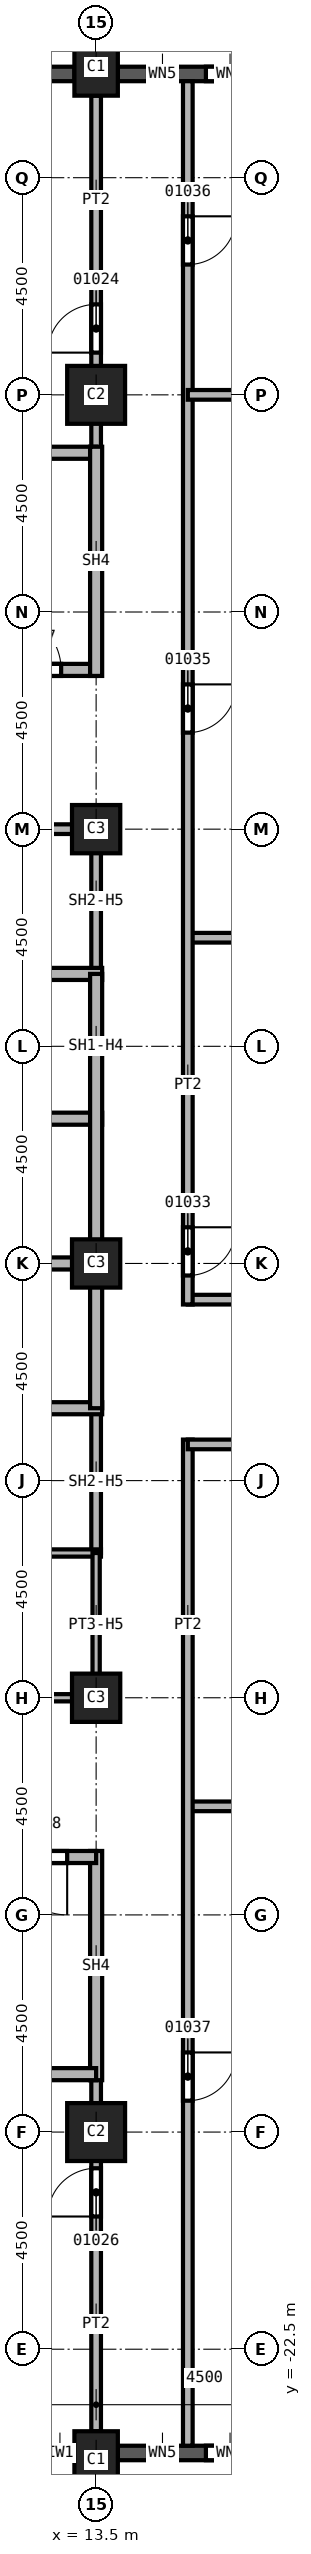
"""IFC4 building model, lengths in metres.
Left out: names, types, materials, properties, quantities, classifications, styles, units other than length and angle.
Written with IfcOpenShell. Run it as: python <this file> out.ifc"""

import sys

from ifc_helpers import new_model, si_unit, direction, frame, frame_2d, origin, origin_2d, place, context, subcontext, project, spatial, rectangle, extrude, element, fill, save


model = new_model("IFC4")
c1 = context("Model", 3, precision=1e-05, world=origin(), true_north=direction((0.0, 1.0)))
c2 = subcontext(c1, "Body", "Model", "MODEL_VIEW")
j1 = project(units=[si_unit("LENGTHUNIT", "METRE"), si_unit("PLANEANGLEUNIT", "RADIAN")], contexts=[c1])
p1 = place(None, origin())
s1 = spatial("IfcSite", under=j1, at=p1, CompositionType="ELEMENT")
p2 = place(p1, origin())
s2 = spatial("IfcBuilding", under=s1, at=p2, CompositionType="ELEMENT")
p3 = place(p2, frame((0.0, 0.0, 68.0)))
s3 = spatial("IfcBuildingStorey", under=s2, at=p3, CompositionType="ELEMENT", Elevation=68.0)
for number, where, z_axis, x_axis in (
    (1, (13.5, 18.0, 0.0), (0.0, 0.0, 1.0), (1.0, 0.0, 0.0)),
    (2, (13.5, -18.0, 0.0), (0.0, 0.0, 1.0), (1.0, 0.0, 0.0)),
):
    element("IfcColumn", number, at=place(p3, frame(where, z_axis=z_axis, x_axis=x_axis)), inside=s3, PredefinedType="COLUMN", context=c2, shape_type="SweptSolid", body=[
        extrude(rectangle(XDim=1.2, YDim=1.2, at=origin_2d()), origin(), (0.0, 0.0, 1.0), 3.7),
    ])
for number, where, z_axis, x_axis in (
    (3, (13.5, 0.0, 0.0), (0.0, 0.0, 1.0), (1.0, 0.0, 0.0)),
    (4, (13.5, 9.0, 0.0), (0.0, 0.0, 1.0), (1.0, 0.0, 0.0)),
    (5, (13.5, -9.0, 0.0), (0.0, 0.0, 1.0), (1.0, 0.0, 0.0)),
):
    element("IfcColumn", number, at=place(p3, frame(where, z_axis=z_axis, x_axis=x_axis)), inside=s3, PredefinedType="COLUMN", context=c2, shape_type="SweptSolid", body=[
        extrude(rectangle(XDim=1.0, YDim=1.0, at=origin_2d()), origin(), (0.0, 0.0, 1.0), 3.7),
    ])
for number, where, z_axis, x_axis in (
    (6, (13.5, 24.8, 0.0), (0.0, 0.0, 1.0), (1.0, 0.0, 0.0)),
    (7, (13.5, -24.8, 0.0), (0.0, 0.0, 1.0), (1.0, 0.0, 0.0)),
):
    element("IfcColumn", number, at=place(p3, frame(where, z_axis=z_axis, x_axis=x_axis)), inside=s3, PredefinedType="COLUMN", context=c2, shape_type="SweptSolid", body=[
        extrude(rectangle(XDim=0.9, YDim=1.2, at=origin_2d()), origin(), (0.0, 0.0, 1.0), 3.7),
    ])
p4 = place(p3, frame((9.45, -24.65, 0.0), z_axis=(0.0, 0.0, 1.0), x_axis=(1.0, 0.0, 0.0)))
e8 = element("IfcWall", 8, at=p4, inside=s3, PredefinedType="SOLIDWALL", context=c2, shape_type="SweptSolid", body=[
    extrude(rectangle(XDim=3.6, YDim=0.3, at=frame_2d((1.8, 0.0))), origin(), (0.0, 0.0, 1.0), 3.1),
])
p5 = place(p4, frame((0.6, 0.0, 0.8)))
e9 = element("IfcOpeningElement", 9, at=p5, cuts=e8, PredefinedType="OPENING", context=c2, shape_type="SweptSolid", body=[
    extrude(rectangle(XDim=2.4, YDim=1.95, at=frame_2d((1.2, 0.975))), frame((0.0, 0.15, 0.0), z_axis=(0.0, -1.0, 0.0), x_axis=(1.0, 0.0, 0.0)), (0.0, 0.0, 1.0), 0.3),
])
p6 = place(p3, frame((13.95, -24.65, 0.0), z_axis=(0.0, 0.0, 1.0), x_axis=(1.0, 0.0, 0.0)))
e10 = element("IfcWall", 10, at=p6, inside=s3, PredefinedType="SOLIDWALL", context=c2, shape_type="SweptSolid", body=[
    extrude(rectangle(XDim=3.6, YDim=0.3, at=frame_2d((1.8, 0.0))), origin(), (0.0, 0.0, 1.0), 3.1),
])
p7 = place(p6, frame((0.625, 0.0, 0.8)))
e11 = element("IfcOpeningElement", 11, at=p7, cuts=e10, PredefinedType="OPENING", context=c2, shape_type="SweptSolid", body=[
    extrude(rectangle(XDim=0.6, YDim=1.95, at=frame_2d((0.3, 0.975))), frame((0.0, 0.15, 0.0), z_axis=(0.0, -1.0, 0.0), x_axis=(1.0, 0.0, 0.0)), (0.0, 0.0, 1.0), 0.3),
])
p8 = place(p6, frame((1.825, 0.0, 0.8)))
e12 = element("IfcOpeningElement", 12, at=p8, cuts=e10, PredefinedType="OPENING", context=c2, shape_type="SweptSolid", body=[
    extrude(rectangle(XDim=1.0, YDim=1.95, at=frame_2d((0.5, 0.975))), frame((0.0, 0.15, 0.0), z_axis=(0.0, -1.0, 0.0), x_axis=(1.0, 0.0, 0.0)), (0.0, 0.0, 1.0), 0.3),
])
p9 = place(p3, frame((17.55, 24.65, 0.0), z_axis=(0.0, 0.0, 1.0), x_axis=(-1.0, 0.0, 0.0)))
e13 = element("IfcWall", 13, at=p9, inside=s3, PredefinedType="SOLIDWALL", context=c2, shape_type="SweptSolid", body=[
    extrude(rectangle(XDim=3.6, YDim=0.3, at=frame_2d((1.8, 0.0))), origin(), (0.0, 0.0, 1.0), 3.1),
])
p10 = place(p9, frame((0.775, 0.0, 0.8)))
e14 = element("IfcOpeningElement", 14, at=p10, cuts=e13, PredefinedType="OPENING", context=c2, shape_type="SweptSolid", body=[
    extrude(rectangle(XDim=1.0, YDim=1.95, at=frame_2d((0.5, 0.975))), frame((0.0, 0.15, 0.0), z_axis=(0.0, -1.0, 0.0), x_axis=(1.0, 0.0, 0.0)), (0.0, 0.0, 1.0), 0.3),
])
p11 = place(p9, frame((2.375, 0.0, 0.8)))
e15 = element("IfcOpeningElement", 15, at=p11, cuts=e13, PredefinedType="OPENING", context=c2, shape_type="SweptSolid", body=[
    extrude(rectangle(XDim=0.6, YDim=1.95, at=frame_2d((0.3, 0.975))), frame((0.0, 0.15, 0.0), z_axis=(0.0, -1.0, 0.0), x_axis=(1.0, 0.0, 0.0)), (0.0, 0.0, 1.0), 0.3),
])
p12 = place(p3, frame((13.05, 24.65, 0.0), z_axis=(0.0, 0.0, 1.0), x_axis=(-1.0, 0.0, 0.0)))
e16 = element("IfcWall", 16, at=p12, inside=s3, PredefinedType="SOLIDWALL", context=c2, shape_type="SweptSolid", body=[
    extrude(rectangle(XDim=3.6, YDim=0.3, at=frame_2d((1.8, 0.0))), origin(), (0.0, 0.0, 1.0), 3.1),
])
p13 = place(p12, frame((0.6, 0.0, 0.8)))
e17 = element("IfcOpeningElement", 17, at=p13, cuts=e16, PredefinedType="OPENING", context=c2, shape_type="SweptSolid", body=[
    extrude(rectangle(XDim=2.4, YDim=1.95, at=frame_2d((1.2, 0.975))), frame((0.0, 0.15, 0.0), z_axis=(0.0, -1.0, 0.0), x_axis=(1.0, 0.0, 0.0)), (0.0, 0.0, 1.0), 0.3),
])
p14 = place(p3, frame((13.5, -24.2, 0.0), z_axis=(0.0, 0.0, 1.0), x_axis=(0.0, 1.0, 0.0)))
e18 = element("IfcWall", 18, at=p14, inside=s3, PredefinedType="PARTITIONING", context=c2, shape_type="SweptSolid", body=[
    extrude(rectangle(XDim=7.525, YDim=0.2, at=frame_2d((3.762, 0.0))), origin(), (0.0, 0.0, 1.0), 3.7),
])
p15 = place(p14, frame((4.45, 0.0, 0.0)))
e19 = element("IfcOpeningElement", 19, at=p15, cuts=e18, PredefinedType="OPENING", context=c2, shape_type="SweptSolid", body=[
    extrude(rectangle(XDim=1.0, YDim=2.1, at=frame_2d((0.5, 1.05))), frame((0.0, 0.1, 0.0), z_axis=(0.0, -1.0, 0.0), x_axis=(1.0, 0.0, 0.0)), (0.0, 0.0, 1.0), 0.2),
])
p16 = place(p3, frame((13.5, 16.675, 0.0), z_axis=(0.0, 0.0, 1.0), x_axis=(0.0, 1.0, 0.0)))
e20 = element("IfcWall", 20, at=p16, inside=s3, PredefinedType="PARTITIONING", context=c2, shape_type="SweptSolid", body=[
    extrude(rectangle(XDim=7.525, YDim=0.2, at=frame_2d((3.762, 0.0))), origin(), (0.0, 0.0, 1.0), 3.7),
])
p17 = place(p16, frame((2.2, 0.0, 0.0)))
e21 = element("IfcOpeningElement", 21, at=p17, cuts=e20, PredefinedType="OPENING", context=c2, shape_type="SweptSolid", body=[
    extrude(rectangle(XDim=1.0, YDim=2.1, at=frame_2d((0.5, 1.05))), frame((0.0, 0.1, 0.0), z_axis=(0.0, -1.0, 0.0), x_axis=(1.0, 0.0, 0.0)), (0.0, 0.0, 1.0), 0.2),
])
p18 = place(p3, frame((15.4, -11.25, 0.0), z_axis=(0.0, 0.0, 1.0), x_axis=(1.0, 0.0, 0.0)))
e22 = element("IfcWall", 22, at=p18, inside=s3, PredefinedType="PARTITIONING", context=c2, shape_type="SweptSolid", body=[
    extrude(rectangle(XDim=11.7, YDim=0.2, at=frame_2d((5.85, 0.0))), origin(), (0.0, 0.0, 1.0), 3.7),
])
p19 = place(p3, frame((15.4, -3.65, 0.0), z_axis=(0.0, 0.0, 1.0), x_axis=(0.0, -1.0, 0.0)))
e23 = element("IfcWall", 23, at=p19, inside=s3, PredefinedType="PARTITIONING", context=c2, shape_type="SweptSolid", body=[
    extrude(rectangle(XDim=20.85, YDim=0.2, at=frame_2d((10.425, 0.0))), origin(), (0.0, 0.0, 1.0), 3.7),
])
p20 = place(p19, frame((12.7, 0.0, 0.0)))
e24 = element("IfcOpeningElement", 24, at=p20, cuts=e23, PredefinedType="OPENING", context=c2, shape_type="SweptSolid", body=[
    extrude(rectangle(XDim=1.0, YDim=2.1, at=frame_2d((0.5, 1.05))), frame((0.0, 0.1, 0.0), z_axis=(0.0, -1.0, 0.0), x_axis=(1.0, 0.0, 0.0)), (0.0, 0.0, 1.0), 0.2),
])
p21 = place(p3, frame((15.4, -0.75, 0.0), z_axis=(0.0, 0.0, 1.0), x_axis=(1.0, 0.0, 0.0)))
e25 = element("IfcWall", 25, at=p21, inside=s3, PredefinedType="PARTITIONING", context=c2, shape_type="SweptSolid", body=[
    extrude(rectangle(XDim=18.45, YDim=0.2, at=frame_2d((9.225, 0.0))), origin(), (0.0, 0.0, 1.0), 3.7),
])
p22 = place(p3, frame((15.4, 6.75, 0.0), z_axis=(0.0, 0.0, 1.0), x_axis=(1.0, 0.0, 0.0)))
e26 = element("IfcWall", 26, at=p22, inside=s3, PredefinedType="PARTITIONING", context=c2, shape_type="SweptSolid", body=[
    extrude(rectangle(XDim=11.7, YDim=0.2, at=frame_2d((5.85, 0.0))), origin(), (0.0, 0.0, 1.0), 3.7),
])
p23 = place(p3, frame((15.4, 24.5, 0.0), z_axis=(0.0, 0.0, 1.0), x_axis=(0.0, -1.0, 0.0)))
e27 = element("IfcWall", 27, at=p23, inside=s3, PredefinedType="PARTITIONING", context=c2, shape_type="SweptSolid", body=[
    extrude(rectangle(XDim=25.35, YDim=0.2, at=frame_2d((12.675, 0.0))), origin(), (0.0, 0.0, 1.0), 3.7),
])
p24 = place(p23, frame((23.75, 0.0, 0.0)))
e28 = element("IfcOpeningElement", 28, at=p24, cuts=e27, PredefinedType="OPENING", context=c2, shape_type="SweptSolid", body=[
    extrude(rectangle(XDim=1.0, YDim=2.1, at=frame_2d((0.5, 1.05))), frame((0.0, 0.1, 0.0), z_axis=(0.0, -1.0, 0.0), x_axis=(1.0, 0.0, 0.0)), (0.0, 0.0, 1.0), 0.2),
])
p25 = place(p23, frame((12.5, 0.0, 0.0)))
e29 = element("IfcOpeningElement", 29, at=p25, cuts=e27, PredefinedType="OPENING", context=c2, shape_type="SweptSolid", body=[
    extrude(rectangle(XDim=1.0, YDim=2.1, at=frame_2d((0.5, 1.05))), frame((0.0, 0.1, 0.0), z_axis=(0.0, -1.0, 0.0), x_axis=(1.0, 0.0, 0.0)), (0.0, 0.0, 1.0), 0.2),
])
p26 = place(p23, frame((2.8, 0.0, 0.0)))
e30 = element("IfcOpeningElement", 30, at=p26, cuts=e27, PredefinedType="OPENING", context=c2, shape_type="SweptSolid", body=[
    extrude(rectangle(XDim=1.0, YDim=2.1, at=frame_2d((0.5, 1.05))), frame((0.0, 0.1, 0.0), z_axis=(0.0, -1.0, 0.0), x_axis=(1.0, 0.0, 0.0)), (0.0, 0.0, 1.0), 0.2),
])
p27 = place(p3, frame((15.4, 18.0, 0.0), z_axis=(0.0, 0.0, 1.0), x_axis=(1.0, 0.0, 0.0)))
e31 = element("IfcWall", 31, at=p27, inside=s3, PredefinedType="PARTITIONING", context=c2, shape_type="SweptSolid", body=[
    extrude(rectangle(XDim=8.75, YDim=0.2, at=frame_2d((4.375, 0.0))), origin(), (0.0, 0.0, 1.0), 3.7),
])
p28 = place(p3, frame((33.85, -3.75, 0.0), z_axis=(0.0, 0.0, 1.0), x_axis=(-1.0, 0.0, 0.0)))
e32 = element("IfcWall", 32, at=p28, inside=s3, PredefinedType="PARTITIONING", context=c2, shape_type="SweptSolid", body=[
    extrude(rectangle(XDim=18.45, YDim=0.2, at=frame_2d((9.225, 0.0))), origin(), (0.0, 0.0, 1.0), 3.7),
])
p29 = place(p28, frame((9.4, 0.0, 0.0)))
e33 = element("IfcOpeningElement", 33, at=p29, cuts=e32, PredefinedType="OPENING", context=c2, shape_type="SweptSolid", body=[
    extrude(rectangle(XDim=1.0, YDim=2.1, at=frame_2d((0.5, 1.05))), frame((0.0, 0.1, 0.0), z_axis=(0.0, -1.0, 0.0), x_axis=(1.0, 0.0, 0.0)), (0.0, 0.0, 1.0), 0.2),
])
for number, where, z_axis, x_axis in (
    (34, (10.5, 9.0, 0.0), (0.0, 0.0, 1.0), (1.0, 0.0, 0.0)),
    (35, (13.5, -3.0, 0.0), (0.0, 0.0, 1.0), (0.0, -1.0, 0.0)),
):
    element("IfcWall", number, at=place(p3, frame(where, z_axis=z_axis, x_axis=x_axis)), inside=s3, PredefinedType="SOLIDWALL", context=c2, shape_type="SweptSolid", body=[
        extrude(rectangle(XDim=3.0, YDim=0.2, at=frame_2d((1.5, 0.0))), origin(), (0.0, 0.0, 1.0), 2.938),
    ])
p30 = place(p3, frame((13.5, 9.1, 0.0), z_axis=(0.0, 0.0, 1.0), x_axis=(0.0, -1.0, 0.0)))
e36 = element("IfcWall", 36, at=p30, inside=s3, PredefinedType="SOLIDWALL", context=c2, shape_type="SweptSolid", body=[
    extrude(rectangle(XDim=3.1, YDim=0.2, at=frame_2d((1.55, 0.0))), origin(), (0.0, 0.0, 1.0), 2.938),
])
p31 = place(p3, frame((4.375, 3.0, 0.0), z_axis=(0.0, 0.0, 1.0), x_axis=(1.0, 0.0, 0.0)))
e37 = element("IfcWall", 37, at=p31, inside=s3, PredefinedType="SOLIDWALL", context=c2, shape_type="SweptSolid", body=[
    extrude(rectangle(XDim=9.25, YDim=0.25, at=frame_2d((4.625, 0.0))), origin(), (0.0, 0.0, 1.0), 3.7),
])
p32 = place(p31, frame((3.375, 0.0, 0.0)))
e38 = element("IfcOpeningElement", 38, at=p32, cuts=e37, PredefinedType="OPENING", context=c2, shape_type="SweptSolid", body=[
    extrude(rectangle(XDim=1.1, YDim=2.1, at=frame_2d((0.55, 1.05))), frame((0.0, 0.125, 0.0), z_axis=(0.0, -1.0, 0.0), x_axis=(1.0, 0.0, 0.0)), (0.0, 0.0, 1.0), 0.25),
])
p33 = place(p3, frame((7.5, -3.0, 0.0), z_axis=(0.0, 0.0, 1.0), x_axis=(1.0, 0.0, 0.0)))
e39 = element("IfcWall", 39, at=p33, inside=s3, PredefinedType="SOLIDWALL", context=c2, shape_type="SweptSolid", body=[
    extrude(rectangle(XDim=6.125, YDim=0.25, at=frame_2d((3.062, 0.0))), origin(), (0.0, 0.0, 1.0), 3.7),
])
p34 = place(p33, frame((0.25, 0.0, 0.0)))
e40 = element("IfcOpeningElement", 40, at=p34, cuts=e39, PredefinedType="OPENING", context=c2, shape_type="SweptSolid", body=[
    extrude(rectangle(XDim=1.1, YDim=2.1, at=frame_2d((0.55, 1.05))), frame((0.0, 0.125, 0.0), z_axis=(0.0, -1.0, 0.0), x_axis=(1.0, 0.0, 0.0)), (0.0, 0.0, 1.0), 0.25),
])
for number, where, z_axis, x_axis in (
    (41, (10.5, 0.0, 0.0), (0.0, 0.0, 1.0), (1.0, 0.0, 0.0)),
    (42, (10.5, 6.0, 0.0), (0.0, 0.0, 1.0), (1.0, 0.0, 0.0)),
):
    element("IfcWall", number, at=place(p3, frame(where, z_axis=z_axis, x_axis=x_axis)), inside=s3, PredefinedType="SOLIDWALL", context=c2, shape_type="SweptSolid", body=[
        extrude(rectangle(XDim=3.125, YDim=0.25, at=frame_2d((1.562, 0.0))), origin(), (0.0, 0.0, 1.0), 3.7),
    ])
p35 = place(p3, frame((13.5, 6.0, 0.0), z_axis=(0.0, 0.0, 1.0), x_axis=(0.0, -1.0, 0.0)))
e43 = element("IfcWall", 43, at=p35, inside=s3, PredefinedType="SOLIDWALL", context=c2, shape_type="SweptSolid", body=[
    extrude(rectangle(XDim=9.0, YDim=0.25, at=frame_2d((4.5, 0.0))), origin(), (0.0, 0.0, 1.0), 2.938),
])
p36 = place(p3, frame((4.375, 12.3, 0.0), z_axis=(0.0, 0.0, 1.0), x_axis=(1.0, 0.0, 0.0)))
e44 = element("IfcWall", 44, at=p36, inside=s3, PredefinedType="SOLIDWALL", context=c2, shape_type="SweptSolid", body=[
    extrude(rectangle(XDim=9.125, YDim=0.25, at=frame_2d((4.562, 0.0))), origin(), (0.0, 0.0, 1.0), 3.7),
])
p37 = place(p36, frame((7.2, 0.0, 0.0)))
e45 = element("IfcOpeningElement", 45, at=p37, cuts=e44, PredefinedType="OPENING", context=c2, shape_type="SweptSolid", body=[
    extrude(rectangle(XDim=1.2, YDim=2.1, at=frame_2d((0.6, 1.05))), frame((0.0, 0.125, 0.0), z_axis=(0.0, -1.0, 0.0), x_axis=(1.0, 0.0, 0.0)), (0.0, 0.0, 1.0), 0.25),
])
p38 = place(p3, frame((4.375, 16.8, 0.0), z_axis=(0.0, 0.0, 1.0), x_axis=(1.0, 0.0, 0.0)))
e46 = element("IfcWall", 46, at=p38, inside=s3, PredefinedType="SOLIDWALL", context=c2, shape_type="SweptSolid", body=[
    extrude(rectangle(XDim=9.125, YDim=0.25, at=frame_2d((4.562, 0.0))), origin(), (0.0, 0.0, 1.0), 3.7),
])
p39 = place(p3, frame((13.5, -16.925, 0.0), z_axis=(0.0, 0.0, 1.0), x_axis=(0.0, 1.0, 0.0)))
e47 = element("IfcWall", 47, at=p39, inside=s3, PredefinedType="SOLIDWALL", context=c2, shape_type="SweptSolid", body=[
    extrude(rectangle(XDim=4.75, YDim=0.25, at=frame_2d((2.375, 0.0))), origin(), (0.0, 0.0, 1.0), 3.7),
])
p40 = place(p3, frame((13.5, -16.8, 0.0), z_axis=(0.0, 0.0, 1.0), x_axis=(-1.0, 0.0, 0.0)))
e48 = element("IfcWall", 48, at=p40, inside=s3, PredefinedType="SOLIDWALL", context=c2, shape_type="SweptSolid", body=[
    extrude(rectangle(XDim=9.125, YDim=0.25, at=frame_2d((4.562, 0.0))), origin(), (0.0, 0.0, 1.0), 3.7),
])
p41 = place(p3, frame((13.5, -12.3, 0.0), z_axis=(0.0, 0.0, 1.0), x_axis=(-1.0, 0.0, 0.0)))
e49 = element("IfcWall", 49, at=p41, inside=s3, PredefinedType="SOLIDWALL", context=c2, shape_type="SweptSolid", body=[
    extrude(rectangle(XDim=9.125, YDim=0.25, at=frame_2d((4.562, 0.0))), origin(), (0.0, 0.0, 1.0), 3.7),
])
p42 = place(p41, frame((0.6, 0.0, 0.0)))
e50 = element("IfcOpeningElement", 50, at=p42, cuts=e49, PredefinedType="OPENING", context=c2, shape_type="SweptSolid", body=[
    extrude(rectangle(XDim=1.2, YDim=2.1, at=frame_2d((0.6, 1.05))), frame((0.0, 0.125, 0.0), z_axis=(0.0, -1.0, 0.0), x_axis=(1.0, 0.0, 0.0)), (0.0, 0.0, 1.0), 0.25),
])
p43 = place(p3, frame((13.5, 12.175, 0.0), z_axis=(0.0, 0.0, 1.0), x_axis=(0.0, 1.0, 0.0)))
e51 = element("IfcWall", 51, at=p43, inside=s3, PredefinedType="SOLIDWALL", context=c2, shape_type="SweptSolid", body=[
    extrude(rectangle(XDim=4.75, YDim=0.25, at=frame_2d((2.375, 0.0))), origin(), (0.0, 0.0, 1.0), 3.7),
])
p44 = place(p3, frame((10.5, -6.0, 0.0), z_axis=(0.0, 0.0, 1.0), x_axis=(1.0, 0.0, 0.0)))
e52 = element("IfcWall", 52, at=p44, inside=s3, PredefinedType="PARTITIONING", context=c2, shape_type="SweptSolid", body=[
    extrude(rectangle(XDim=3.1, YDim=0.15, at=frame_2d((1.55, 0.0))), origin(), (0.0, 0.0, 1.0), 3.7),
])
p45 = place(p3, frame((13.5, -9.0, 0.0), z_axis=(0.0, 0.0, 1.0), x_axis=(-1.0, 0.0, 0.0)))
e53 = element("IfcWall", 53, at=p45, inside=s3, PredefinedType="PARTITIONING", context=c2, shape_type="SweptSolid", body=[
    extrude(rectangle(XDim=3.0, YDim=0.15, at=frame_2d((1.5, 0.0))), origin(), (0.0, 0.0, 1.0), 2.938),
])
p46 = place(p3, frame((13.5, -6.0, 0.0), z_axis=(0.0, 0.0, 1.0), x_axis=(0.0, -1.0, 0.0)))
e54 = element("IfcWall", 54, at=p46, inside=s3, PredefinedType="PARTITIONING", context=c2, shape_type="SweptSolid", body=[
    extrude(rectangle(XDim=3.075, YDim=0.15, at=frame_2d((1.538, 0.0))), origin(), (0.0, 0.0, 1.0), 2.938),
])
p47 = place(p37, origin())
e55 = element("IfcDoor", 55, at=p47, inside=s3, OperationType="SINGLE_SWING_RIGHT", PredefinedType="DOOR", context=c2, shape_type="SweptSolid", body=[
    extrude(rectangle(XDim=1.2, YDim=2.1, at=frame_2d((0.6, 1.05))), frame((0.0, 0.025, 0.0), z_axis=(0.0, -1.0, 0.0), x_axis=(1.0, 0.0, 0.0)), (0.0, 0.0, 1.0), 0.05),
])
fill(e45, e55)
p48 = place(p42, origin())
e56 = element("IfcDoor", 56, at=p48, inside=s3, OperationType="SINGLE_SWING_LEFT", PredefinedType="DOOR", context=c2, shape_type="SweptSolid", body=[
    extrude(rectangle(XDim=1.2, YDim=2.1, at=frame_2d((0.6, 1.05))), frame((0.0, 0.025, 0.0), z_axis=(0.0, -1.0, 0.0), x_axis=(1.0, 0.0, 0.0)), (0.0, 0.0, 1.0), 0.05),
])
fill(e50, e56)
p49 = place(p17, origin())
e57 = element("IfcDoor", 57, at=p49, inside=s3, OperationType="SINGLE_SWING_LEFT", PredefinedType="DOOR", context=c2, shape_type="SweptSolid", body=[
    extrude(rectangle(XDim=1.0, YDim=2.1, at=frame_2d((0.5, 1.05))), frame((0.0, 0.025, 0.0), z_axis=(0.0, -1.0, 0.0), x_axis=(1.0, 0.0, 0.0)), (0.0, 0.0, 1.0), 0.05),
])
fill(e21, e57)
p50 = place(p15, origin())
e58 = element("IfcDoor", 58, at=p50, inside=s3, OperationType="SINGLE_SWING_LEFT", PredefinedType="DOOR", context=c2, shape_type="SweptSolid", body=[
    extrude(rectangle(XDim=1.0, YDim=2.1, at=frame_2d((0.5, 1.05))), frame((0.0, 0.025, 0.0), z_axis=(0.0, -1.0, 0.0), x_axis=(1.0, 0.0, 0.0)), (0.0, 0.0, 1.0), 0.05),
])
fill(e19, e58)
p51 = place(p24, origin())
e59 = element("IfcDoor", 59, at=p51, inside=s3, OperationType="SINGLE_SWING_RIGHT", PredefinedType="DOOR", context=c2, shape_type="SweptSolid", body=[
    extrude(rectangle(XDim=1.0, YDim=2.1, at=frame_2d((0.5, 1.05))), frame((0.0, 0.025, 0.0), z_axis=(0.0, -1.0, 0.0), x_axis=(1.0, 0.0, 0.0)), (0.0, 0.0, 1.0), 0.05),
])
fill(e28, e59)
p52 = place(p25, origin())
e60 = element("IfcDoor", 60, at=p52, inside=s3, OperationType="SINGLE_SWING_RIGHT", PredefinedType="DOOR", context=c2, shape_type="SweptSolid", body=[
    extrude(rectangle(XDim=1.0, YDim=2.1, at=frame_2d((0.5, 1.05))), frame((0.0, 0.025, 0.0), z_axis=(0.0, -1.0, 0.0), x_axis=(1.0, 0.0, 0.0)), (0.0, 0.0, 1.0), 0.05),
])
fill(e29, e60)
p53 = place(p26, origin())
e61 = element("IfcDoor", 61, at=p53, inside=s3, OperationType="SINGLE_SWING_LEFT", PredefinedType="DOOR", context=c2, shape_type="SweptSolid", body=[
    extrude(rectangle(XDim=1.0, YDim=2.1, at=frame_2d((0.5, 1.05))), frame((0.0, 0.025, 0.0), z_axis=(0.0, -1.0, 0.0), x_axis=(1.0, 0.0, 0.0)), (0.0, 0.0, 1.0), 0.05),
])
fill(e30, e61)
p54 = place(p20, origin())
e62 = element("IfcDoor", 62, at=p54, inside=s3, OperationType="SINGLE_SWING_RIGHT", PredefinedType="DOOR", context=c2, shape_type="SweptSolid", body=[
    extrude(rectangle(XDim=1.0, YDim=2.1, at=frame_2d((0.5, 1.05))), frame((0.0, 0.025, 0.0), z_axis=(0.0, -1.0, 0.0), x_axis=(1.0, 0.0, 0.0)), (0.0, 0.0, 1.0), 0.05),
])
fill(e24, e62)
p55 = place(p7, origin())
e63 = element("IfcWindow", 63, at=p55, inside=s3, PartitioningType="SINGLE_PANEL", PredefinedType="WINDOW", context=c2, shape_type="SweptSolid", body=[
    extrude(rectangle(XDim=0.6, YDim=1.95, at=frame_2d((0.3, 0.975))), frame((0.0, 0.03, 0.0), z_axis=(0.0, -1.0, 0.0), x_axis=(1.0, 0.0, 0.0)), (0.0, 0.0, 1.0), 0.06),
])
fill(e11, e63)
p56 = place(p8, origin())
e64 = element("IfcWindow", 64, at=p56, inside=s3, PartitioningType="SINGLE_PANEL", PredefinedType="WINDOW", context=c2, shape_type="SweptSolid", body=[
    extrude(rectangle(XDim=1.0, YDim=1.95, at=frame_2d((0.5, 0.975))), frame((0.0, 0.03, 0.0), z_axis=(0.0, -1.0, 0.0), x_axis=(1.0, 0.0, 0.0)), (0.0, 0.0, 1.0), 0.06),
])
fill(e12, e64)
p57 = place(p10, origin())
e65 = element("IfcWindow", 65, at=p57, inside=s3, PartitioningType="SINGLE_PANEL", PredefinedType="WINDOW", context=c2, shape_type="SweptSolid", body=[
    extrude(rectangle(XDim=1.0, YDim=1.95, at=frame_2d((0.5, 0.975))), frame((0.0, 0.03, 0.0), z_axis=(0.0, -1.0, 0.0), x_axis=(1.0, 0.0, 0.0)), (0.0, 0.0, 1.0), 0.06),
])
fill(e14, e65)
p58 = place(p11, origin())
e66 = element("IfcWindow", 66, at=p58, inside=s3, PartitioningType="SINGLE_PANEL", PredefinedType="WINDOW", context=c2, shape_type="SweptSolid", body=[
    extrude(rectangle(XDim=0.6, YDim=1.95, at=frame_2d((0.3, 0.975))), frame((0.0, 0.03, 0.0), z_axis=(0.0, -1.0, 0.0), x_axis=(1.0, 0.0, 0.0)), (0.0, 0.0, 1.0), 0.06),
])
fill(e15, e66)
save(model, sys.argv[1])
